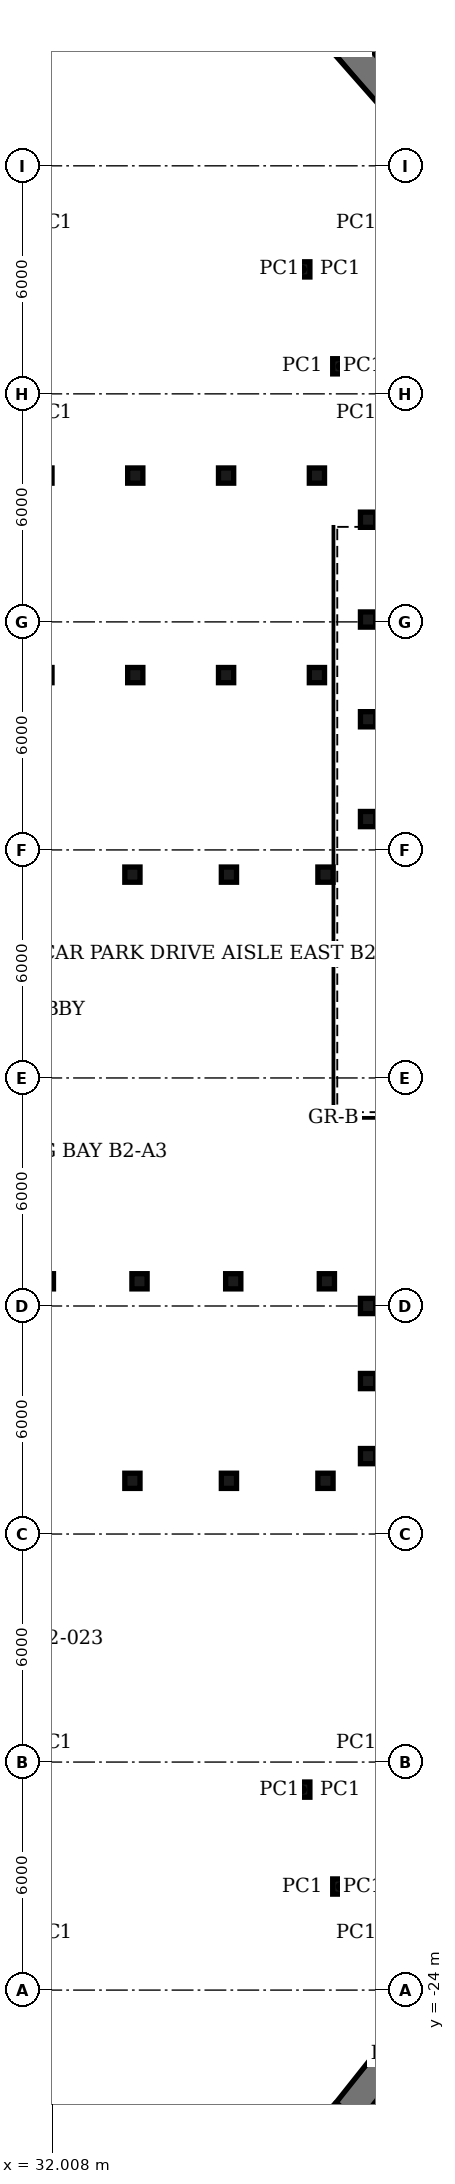
"""IFC4 building model, lengths in metres.
Left out: names, types, materials, properties, quantities, classifications, styles, units other than length and angle.
Written with IfcOpenShell. Run it as: python <this file> out.ifc"""

import sys

from ifc_helpers import new_model, si_unit, direction, frame, frame_2d, origin, origin_2d, place, context, subcontext, project, spatial, rectangle, extrude, element, save


model = new_model("IFC4")
c1 = context("Model", 3, precision=1e-05, world=origin(), true_north=direction((0.0, 1.0)))
c2 = subcontext(c1, "Body", "Model", "MODEL_VIEW")
j1 = project(units=[si_unit("LENGTHUNIT", "METRE"), si_unit("PLANEANGLEUNIT", "RADIAN")], contexts=[c1])
p1 = place(None, origin())
s1 = spatial("IfcSite", under=j1, at=p1, CompositionType="ELEMENT")
p2 = place(p1, origin())
s2 = spatial("IfcBuilding", under=s1, at=p2, CompositionType="ELEMENT")
p3 = place(p2, frame((0.0, 0.0, -10.5)))
s3 = spatial("IfcBuildingStorey", under=s2, at=p3, CompositionType="ELEMENT", Elevation=-10.5)
p4 = place(p3, frame((42.215, -24.147, 0.0), z_axis=(0.0, 0.0, 1.0), x_axis=(-0.622154611961, -0.782894398252, 0.0)))
e1 = element("IfcWall", 1, at=p4, inside=s3, PredefinedType="SOLIDWALL", context=c2, shape_type="SweptSolid", body=[
    extrude(rectangle(XDim=3.943, YDim=0.8, at=frame_2d((1.971, 0.0))), origin(), (0.0, 0.0, 1.0), 4.5),
])
p5 = place(p3, frame((39.762, -27.234, 0.0), z_axis=(0.0, 0.0, 1.0), x_axis=(-0.697258698396, -0.716819578074, 0.0)))
e2 = element("IfcWall", 2, at=p5, inside=s3, PredefinedType="SOLIDWALL", context=c2, shape_type="SweptSolid", body=[
    extrude(rectangle(XDim=3.944, YDim=0.8, at=frame_2d((1.972, 0.0))), origin(), (0.0, 0.0, 1.0), 4.5),
])
p6 = place(p3, frame((38.422, 28.682, 0.0), z_axis=(0.0, 0.0, 1.0), x_axis=(0.660798136834, -0.750563669756, 0.0)))
e3 = element("IfcWall", 3, at=p6, inside=s3, PredefinedType="SOLIDWALL", context=c2, shape_type="SweptSolid", body=[
    extrude(rectangle(XDim=3.944, YDim=0.8, at=frame_2d((1.972, 0.0))), origin(), (0.0, 0.0, 1.0), 4.5),
])
for number, where, z_axis, x_axis in (
    (4, (32.0, 17.5, 0.0), (0.0, 0.0, 1.0), (1.0, 0.0, 0.0)),
    (5, (40.0, 17.5, 0.0), (0.0, 0.0, 1.0), (1.0, 0.0, 0.0)),
    (6, (40.0, 22.5, 0.0), (0.0, 0.0, 1.0), (1.0, 0.0, 0.0)),
    (7, (32.0, 22.5, 0.0), (0.0, 0.0, 1.0), (1.0, 0.0, 0.0)),
    (8, (38.58, 18.725, 0.0), (0.0, 0.0, 1.0), (1.0, 0.0, 0.0)),
    (9, (39.58, 18.725, 0.0), (0.0, 0.0, 1.0), (1.0, 0.0, 0.0)),
    (10, (39.58, 21.275, 0.0), (0.0, 0.0, 1.0), (1.0, 0.0, 0.0)),
    (11, (38.58, 21.275, 0.0), (0.0, 0.0, 1.0), (1.0, 0.0, 0.0)),
    (12, (32.0, -22.5, 0.0), (0.0, 0.0, 1.0), (1.0, 0.0, 0.0)),
    (13, (40.0, -22.5, 0.0), (0.0, 0.0, 1.0), (1.0, 0.0, 0.0)),
    (14, (40.0, -17.5, 0.0), (0.0, 0.0, 1.0), (1.0, 0.0, 0.0)),
    (15, (32.0, -17.5, 0.0), (0.0, 0.0, 1.0), (1.0, 0.0, 0.0)),
    (16, (38.58, -21.275, 0.0), (0.0, 0.0, 1.0), (1.0, 0.0, 0.0)),
    (17, (39.58, -21.275, 0.0), (0.0, 0.0, 1.0), (1.0, 0.0, 0.0)),
    (18, (39.58, -18.725, 0.0), (0.0, 0.0, 1.0), (1.0, 0.0, 0.0)),
    (19, (38.58, -18.725, 0.0), (0.0, 0.0, 1.0), (1.0, 0.0, 0.0)),
    (20, (39.19, 5.35, 0.0), (0.0, 0.0, 1.0), (1.0, 0.0, 0.0)),
    (21, (36.65, 5.35, 0.0), (0.0, 0.0, 1.0), (1.0, 0.0, 0.0)),
    (22, (34.11, 5.35, 0.0), (0.0, 0.0, 1.0), (1.0, 0.0, 0.0)),
    (23, (34.185, 10.6, 0.0), (0.0, 0.0, 1.0), (1.0, 0.0, 0.0)),
    (24, (36.575, 10.6, 0.0), (0.0, 0.0, 1.0), (1.0, 0.0, 0.0)),
    (25, (38.965, 10.6, 0.0), (0.0, 0.0, 1.0), (1.0, 0.0, 0.0)),
    (26, (40.31, 14.688, 0.0), (0.0, 0.0, 1.0), (1.0, 0.0, 0.0)),
    (27, (40.31, 12.062, 0.0), (0.0, 0.0, 1.0), (1.0, 0.0, 0.0)),
    (28, (40.31, 9.438, 0.0), (0.0, 0.0, 1.0), (1.0, 0.0, 0.0)),
    (29, (40.31, 6.812, 0.0), (0.0, 0.0, 1.0), (1.0, 0.0, 0.0)),
    (30, (39.19, -10.6, 0.0), (0.0, 0.0, 1.0), (1.0, 0.0, 0.0)),
    (31, (36.65, -10.6, 0.0), (0.0, 0.0, 1.0), (1.0, 0.0, 0.0)),
    (32, (34.11, -10.6, 0.0), (0.0, 0.0, 1.0), (1.0, 0.0, 0.0)),
    (33, (31.833, -5.35, 0.0), (0.0, 0.0, 1.0), (1.0, 0.0, 0.0)),
    (34, (34.297, -5.35, 0.0), (0.0, 0.0, 1.0), (1.0, 0.0, 0.0)),
    (35, (36.763, -5.35, 0.0), (0.0, 0.0, 1.0), (1.0, 0.0, 0.0)),
    (36, (39.227, -5.35, 0.0), (0.0, 0.0, 1.0), (1.0, 0.0, 0.0)),
    (37, (40.31, -6.0, 0.0), (0.0, 0.0, 1.0), (1.0, 0.0, 0.0)),
    (38, (40.31, -9.95, 0.0), (0.0, 0.0, 1.0), (1.0, 0.0, 0.0)),
    (39, (40.31, -7.975, 0.0), (0.0, 0.0, 1.0), (1.0, 0.0, 0.0)),
    (40, (34.185, 15.85, 0.0), (0.0, 0.0, 1.0), (1.0, 0.0, 0.0)),
    (41, (36.575, 15.85, 0.0), (0.0, 0.0, 1.0), (1.0, 0.0, 0.0)),
    (42, (38.965, 15.85, 0.0), (0.0, 0.0, 1.0), (1.0, 0.0, 0.0)),
):
    element("IfcColumn", number, at=place(p3, frame(where, z_axis=z_axis, x_axis=x_axis)), inside=s3, PredefinedType="COLUMN", context=c2, shape_type="SweptSolid", body=[
        extrude(rectangle(XDim=0.4, YDim=0.4, at=origin_2d()), origin(), (0.0, 0.0, 1.0), 4.5),
    ])
save(model, sys.argv[1])
